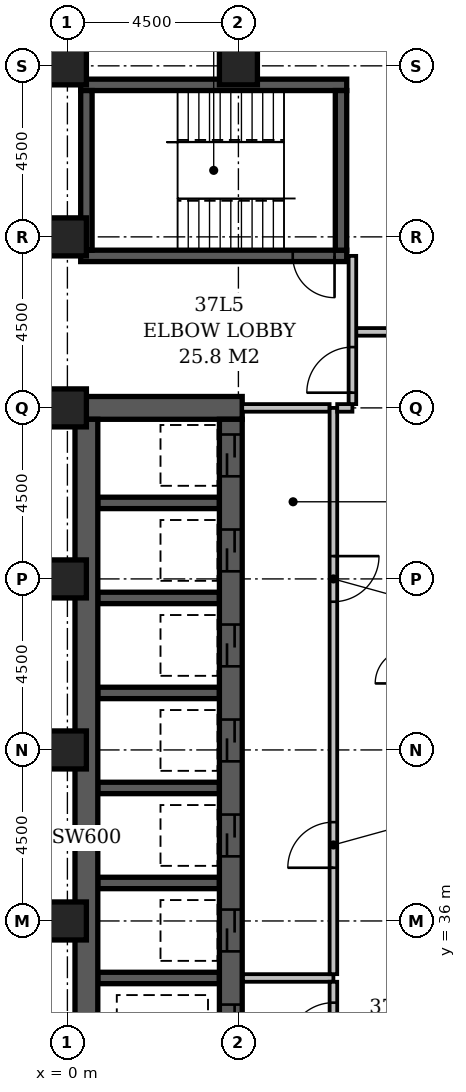
"""IFC4 building model, lengths in metres.
Left out: names, types, materials, properties, quantities, classifications, styles, units other than length and angle.
Written with IfcOpenShell. Run it as: python <this file> out.ifc"""

import sys

from ifc_helpers import new_model, si_unit, direction, frame, frame_2d, origin, origin_2d, place, context, subcontext, project, spatial, rectangle, extrude, element, fill, save


model = new_model("IFC4")
c1 = context("Model", 3, precision=1e-05, world=origin(), true_north=direction((0.0, 1.0)))
c2 = subcontext(c1, "Body", "Model", "MODEL_VIEW")
j1 = project(units=[si_unit("LENGTHUNIT", "METRE"), si_unit("PLANEANGLEUNIT", "RADIAN")], contexts=[c1])
p1 = place(None, origin())
s1 = spatial("IfcSite", under=j1, at=p1, CompositionType="ELEMENT")
p2 = place(p1, origin())
s2 = spatial("IfcBuilding", under=s1, at=p2, CompositionType="ELEMENT")
p3 = place(p2, frame((0.0, 0.0, 148.4)))
s3 = spatial("IfcBuildingStorey", under=s2, at=p3, CompositionType="ELEMENT", Elevation=148.4)
p4 = place(p3, frame((0.2, 49.5, -0.3), z_axis=(0.0, 0.0, 1.0), x_axis=(1.0, 0.0, 0.0)))
e1 = element("IfcWall", 1, at=p4, inside=s3, PredefinedType="SHEAR", context=c2, shape_type="SweptSolid", body=[
    extrude(rectangle(XDim=4.4, YDim=0.6, at=frame_2d((2.2, 0.0))), origin(), (0.0, 0.0, 1.0), 3.6),
])
p5 = place(p3, frame((0.35, 53.5, -0.3), z_axis=(0.0, 0.0, 1.0), x_axis=(1.0, 0.0, 0.0)))
e2 = element("IfcWall", 2, at=p5, inside=s3, PredefinedType="SHEAR", context=c2, shape_type="SweptSolid", body=[
    extrude(rectangle(XDim=7.0, YDim=0.3, at=frame_2d((3.5, 0.0))), origin(), (0.0, 0.0, 1.0), 3.6),
])
p6 = place(p5, frame((5.58, 0.0, 0.3)))
e3 = element("IfcOpeningElement", 3, at=p6, cuts=e2, PredefinedType="OPENING", context=c2, shape_type="SweptSolid", body=[
    extrude(rectangle(XDim=1.1, YDim=2.1, at=frame_2d((0.55, 1.05))), frame((0.0, 0.162, 0.0), z_axis=(0.0, -1.0, 0.0), x_axis=(1.0, 0.0, 0.0)), (0.0, 0.0, 1.0), 0.324),
])
p7 = place(p3, frame((0.35, 58.0, -0.3), z_axis=(0.0, 0.0, 1.0), x_axis=(1.0, 0.0, 0.0)))
e4 = element("IfcWall", 4, at=p7, inside=s3, PredefinedType="SHEAR", context=c2, shape_type="SweptSolid", body=[
    extrude(rectangle(XDim=7.0, YDim=0.3, at=frame_2d((3.5, 0.0))), origin(), (0.0, 0.0, 1.0), 3.6),
])
p8 = place(p3, frame((0.5, 27.15, -0.3), z_axis=(0.0, 0.0, 1.0), x_axis=(0.0, 1.0, 0.0)))
e5 = element("IfcWall", 5, at=p8, inside=s3, PredefinedType="SHEAR", context=c2, shape_type="SweptSolid", body=[
    extrude(rectangle(XDim=22.05, YDim=0.6, at=frame_2d((11.025, 0.0))), origin(), (0.0, 0.0, 1.0), 3.6),
])
p9 = place(p3, frame((0.5, 53.65, -0.3), z_axis=(0.0, 0.0, 1.0), x_axis=(0.0, 1.0, 0.0)))
e6 = element("IfcWall", 6, at=p9, inside=s3, PredefinedType="SHEAR", context=c2, shape_type="SweptSolid", body=[
    extrude(rectangle(XDim=4.2, YDim=0.3, at=frame_2d((2.1, 0.0))), origin(), (0.0, 0.0, 1.0), 3.6),
])
for number, where, z_axis, x_axis in (
    (7, (0.8, 34.5, -0.3), (0.0, 0.0, 1.0), (1.0, 0.0, 0.0)),
    (8, (0.8, 37.0, -0.3), (0.0, 0.0, 1.0), (1.0, 0.0, 0.0)),
    (9, (0.8, 39.5, -0.3), (0.0, 0.0, 1.0), (1.0, 0.0, 0.0)),
    (10, (0.8, 42.0, -0.3), (0.0, 0.0, 1.0), (1.0, 0.0, 0.0)),
    (11, (0.8, 44.5, -0.3), (0.0, 0.0, 1.0), (1.0, 0.0, 0.0)),
    (12, (0.8, 47.0, -0.3), (0.0, 0.0, 1.0), (1.0, 0.0, 0.0)),
):
    element("IfcWall", number, at=place(p3, frame(where, z_axis=z_axis, x_axis=x_axis)), inside=s3, PredefinedType="SHEAR", context=c2, shape_type="SweptSolid", body=[
        extrude(rectangle(XDim=3.2, YDim=0.3, at=frame_2d((1.6, 0.0))), origin(), (0.0, 0.0, 1.0), 3.6),
    ])
p10 = place(p3, frame((4.3, 27.15, -0.3), z_axis=(0.0, 0.0, 1.0), x_axis=(0.0, 1.0, 0.0)))
e13 = element("IfcWall", 13, at=p10, inside=s3, PredefinedType="SHEAR", context=c2, shape_type="SweptSolid", body=[
    extrude(rectangle(XDim=22.05, YDim=0.6, at=frame_2d((11.025, 0.0))), origin(), (0.0, 0.0, 1.0), 3.6),
])
p11 = place(p10, frame((3.05, 0.0, 0.3)))
e14 = element("IfcOpeningElement", 14, at=p11, cuts=e13, PredefinedType="OPENING", context=c2, shape_type="SweptSolid", body=[
    extrude(rectangle(XDim=1.1, YDim=2.1, at=frame_2d((0.55, 1.05))), frame((0.0, 0.312, 0.0), z_axis=(0.0, -1.0, 0.0), x_axis=(1.0, 0.0, 0.0)), (0.0, 0.0, 1.0), 0.624),
])
p12 = place(p10, frame((0.55, 0.0, 0.3)))
e15 = element("IfcOpeningElement", 15, at=p12, cuts=e13, PredefinedType="OPENING", context=c2, shape_type="SweptSolid", body=[
    extrude(rectangle(XDim=1.1, YDim=2.1, at=frame_2d((0.55, 1.05))), frame((0.0, 0.312, 0.0), z_axis=(0.0, -1.0, 0.0), x_axis=(1.0, 0.0, 0.0)), (0.0, 0.0, 1.0), 0.624),
])
p13 = place(p10, frame((20.55, 0.0, 0.3)))
e16 = element("IfcOpeningElement", 16, at=p13, cuts=e13, PredefinedType="OPENING", context=c2, shape_type="SweptSolid", body=[
    extrude(rectangle(XDim=1.1, YDim=2.1, at=frame_2d((0.55, 1.05))), frame((0.0, 0.312, 0.0), z_axis=(0.0, -1.0, 0.0), x_axis=(1.0, 0.0, 0.0)), (0.0, 0.0, 1.0), 0.624),
])
p14 = place(p10, frame((18.05, 0.0, 0.3)))
e17 = element("IfcOpeningElement", 17, at=p14, cuts=e13, PredefinedType="OPENING", context=c2, shape_type="SweptSolid", body=[
    extrude(rectangle(XDim=1.1, YDim=2.1, at=frame_2d((0.55, 1.05))), frame((0.0, 0.312, 0.0), z_axis=(0.0, -1.0, 0.0), x_axis=(1.0, 0.0, 0.0)), (0.0, 0.0, 1.0), 0.624),
])
p15 = place(p10, frame((15.55, 0.0, 0.3)))
e18 = element("IfcOpeningElement", 18, at=p15, cuts=e13, PredefinedType="OPENING", context=c2, shape_type="SweptSolid", body=[
    extrude(rectangle(XDim=1.1, YDim=2.1, at=frame_2d((0.55, 1.05))), frame((0.0, 0.312, 0.0), z_axis=(0.0, -1.0, 0.0), x_axis=(1.0, 0.0, 0.0)), (0.0, 0.0, 1.0), 0.624),
])
p16 = place(p10, frame((13.05, 0.0, 0.3)))
e19 = element("IfcOpeningElement", 19, at=p16, cuts=e13, PredefinedType="OPENING", context=c2, shape_type="SweptSolid", body=[
    extrude(rectangle(XDim=1.1, YDim=2.1, at=frame_2d((0.55, 1.05))), frame((0.0, 0.312, 0.0), z_axis=(0.0, -1.0, 0.0), x_axis=(1.0, 0.0, 0.0)), (0.0, 0.0, 1.0), 0.624),
])
p17 = place(p10, frame((10.55, 0.0, 0.3)))
e20 = element("IfcOpeningElement", 20, at=p17, cuts=e13, PredefinedType="OPENING", context=c2, shape_type="SweptSolid", body=[
    extrude(rectangle(XDim=1.1, YDim=2.1, at=frame_2d((0.55, 1.05))), frame((0.0, 0.312, 0.0), z_axis=(0.0, -1.0, 0.0), x_axis=(1.0, 0.0, 0.0)), (0.0, 0.0, 1.0), 0.624),
])
p18 = place(p10, frame((8.05, 0.0, 0.3)))
e21 = element("IfcOpeningElement", 21, at=p18, cuts=e13, PredefinedType="OPENING", context=c2, shape_type="SweptSolid", body=[
    extrude(rectangle(XDim=1.1, YDim=2.1, at=frame_2d((0.55, 1.05))), frame((0.0, 0.312, 0.0), z_axis=(0.0, -1.0, 0.0), x_axis=(1.0, 0.0, 0.0)), (0.0, 0.0, 1.0), 0.624),
])
p19 = place(p10, frame((5.55, 0.0, 0.3)))
e22 = element("IfcOpeningElement", 22, at=p19, cuts=e13, PredefinedType="OPENING", context=c2, shape_type="SweptSolid", body=[
    extrude(rectangle(XDim=1.1, YDim=2.1, at=frame_2d((0.55, 1.05))), frame((0.0, 0.312, 0.0), z_axis=(0.0, -1.0, 0.0), x_axis=(1.0, 0.0, 0.0)), (0.0, 0.0, 1.0), 0.624),
])
p20 = place(p3, frame((7.2, 53.65, -0.3), z_axis=(0.0, 0.0, 1.0), x_axis=(0.0, 1.0, 0.0)))
e23 = element("IfcWall", 23, at=p20, inside=s3, PredefinedType="SHEAR", context=c2, shape_type="SweptSolid", body=[
    extrude(rectangle(XDim=4.2, YDim=0.3, at=frame_2d((2.1, 0.0))), origin(), (0.0, 0.0, 1.0), 3.6),
])
for number, where, z_axis, x_axis in (
    (24, (0.0, 36.0, -0.3), (0.0, 0.0, 1.0), (1.0, 0.0, 0.0)),
    (25, (0.0, 40.5, -0.3), (0.0, 0.0, 1.0), (1.0, 0.0, 0.0)),
    (26, (0.0, 45.0, -0.3), (0.0, 0.0, 1.0), (1.0, 0.0, 0.0)),
    (27, (0.0, 49.5, -0.3), (0.0, 0.0, 1.0), (1.0, 0.0, 0.0)),
    (28, (0.0, 54.0, -0.3), (0.0, 0.0, 1.0), (1.0, 0.0, 0.0)),
    (29, (0.0, 58.5, -0.3), (0.0, 0.0, 1.0), (1.0, 0.0, 0.0)),
    (30, (4.5, 58.5, -0.3), (0.0, 0.0, 1.0), (1.0, 0.0, 0.0)),
):
    element("IfcColumn", number, at=place(p3, frame(where, z_axis=z_axis, x_axis=x_axis)), inside=s3, PredefinedType="COLUMN", context=c2, shape_type="SweptSolid", body=[
        extrude(rectangle(XDim=1.0, YDim=1.0, at=origin_2d()), origin(), (0.0, 0.0, 1.0), 3.6),
    ])
p21 = place(p3, frame((4.62, 34.5, 0.0), z_axis=(0.0, 0.0, 1.0), x_axis=(1.0, 0.0, 0.0)))
e31 = element("IfcWall", 31, at=p21, inside=s3, PredefinedType="PARTITIONING", context=c2, shape_type="SweptSolid", body=[
    extrude(rectangle(XDim=2.38, YDim=0.2, at=frame_2d((1.19, 0.0))), origin(), (0.0, 0.0, 1.0), 3.3),
])
p22 = place(p3, frame((7.0, 34.6, 0.0), z_axis=(0.0, 0.0, 1.0), x_axis=(0.0, 1.0, 0.0)))
e32 = element("IfcWall", 32, at=p22, inside=s3, PredefinedType="PARTITIONING", context=c2, shape_type="SweptSolid", body=[
    extrude(rectangle(XDim=14.9, YDim=0.2, at=frame_2d((7.45, 0.0))), origin(), (0.0, 0.0, 1.0), 3.3),
])
p23 = place(p22, frame((2.8, 0.0, 0.0)))
e33 = element("IfcOpeningElement", 33, at=p23, cuts=e32, PredefinedType="OPENING", context=c2, shape_type="SweptSolid", body=[
    extrude(rectangle(XDim=1.2, YDim=2.1, at=frame_2d((0.6, 1.05))), frame((0.0, 0.112, 0.0), z_axis=(0.0, -1.0, 0.0), x_axis=(1.0, 0.0, 0.0)), (0.0, 0.0, 1.0), 0.224),
])
p24 = place(p22, frame((9.8, 0.0, 0.0)))
e34 = element("IfcOpeningElement", 34, at=p24, cuts=e32, PredefinedType="OPENING", context=c2, shape_type="SweptSolid", body=[
    extrude(rectangle(XDim=1.2, YDim=2.1, at=frame_2d((0.6, 1.05))), frame((0.0, 0.112, 0.0), z_axis=(0.0, -1.0, 0.0), x_axis=(1.0, 0.0, 0.0)), (0.0, 0.0, 1.0), 0.224),
])
p25 = place(p3, frame((4.6, 49.5, 0.0), z_axis=(0.0, 0.0, 1.0), x_axis=(1.0, 0.0, 0.0)))
e35 = element("IfcWall", 35, at=p25, inside=s3, PredefinedType="PARTITIONING", context=c2, shape_type="SweptSolid", body=[
    extrude(rectangle(XDim=2.3, YDim=0.2, at=frame_2d((1.15, 0.0))), origin(), (0.0, 0.0, 1.0), 3.3),
])
p26 = place(p3, frame((7.0, 32.1, 0.0), z_axis=(0.0, 0.0, 1.0), x_axis=(0.0, 1.0, 0.0)))
e36 = element("IfcWall", 36, at=p26, inside=s3, PredefinedType="PARTITIONING", context=c2, shape_type="SweptSolid", body=[
    extrude(rectangle(XDim=2.3, YDim=0.2, at=frame_2d((1.15, 0.0))), origin(), (0.0, 0.0, 1.0), 3.3),
])
p27 = place(p26, frame((0.55, 0.0, 0.0)))
e37 = element("IfcOpeningElement", 37, at=p27, cuts=e36, PredefinedType="OPENING", context=c2, shape_type="SweptSolid", body=[
    extrude(rectangle(XDim=1.2, YDim=2.1, at=frame_2d((0.6, 1.05))), frame((0.0, 0.112, 0.0), z_axis=(0.0, -1.0, 0.0), x_axis=(1.0, 0.0, 0.0)), (0.0, 0.0, 1.0), 0.224),
])
p28 = place(p3, frame((7.1, 49.5, 0.0), z_axis=(0.0, 0.0, 1.0), x_axis=(1.0, 0.0, 0.0)))
e38 = element("IfcWall", 38, at=p28, inside=s3, PredefinedType="PARTITIONING", context=c2, shape_type="SweptSolid", body=[
    extrude(rectangle(XDim=0.4, YDim=0.2, at=frame_2d((0.2, 0.0))), origin(), (0.0, 0.0, 1.0), 3.3),
])
p29 = place(p3, frame((7.5, 49.6, 0.0), z_axis=(0.0, 0.0, 1.0), x_axis=(0.0, 1.0, 0.0)))
e39 = element("IfcWall", 39, at=p29, inside=s3, PredefinedType="PARTITIONING", context=c2, shape_type="SweptSolid", body=[
    extrude(rectangle(XDim=3.9, YDim=0.2, at=frame_2d((1.95, 0.0))), origin(), (0.0, 0.0, 1.0), 3.3),
])
p30 = place(p29, frame((0.3, 0.0, 0.0)))
e40 = element("IfcOpeningElement", 40, at=p30, cuts=e39, PredefinedType="OPENING", context=c2, shape_type="SweptSolid", body=[
    extrude(rectangle(XDim=1.2, YDim=2.1, at=frame_2d((0.6, 1.05))), frame((0.0, 0.112, 0.0), z_axis=(0.0, -1.0, 0.0), x_axis=(1.0, 0.0, 0.0)), (0.0, 0.0, 1.0), 0.224),
])
p31 = place(p3, frame((7.6, 51.5, 0.0), z_axis=(0.0, 0.0, 1.0), x_axis=(1.0, 0.0, 0.0)))
e41 = element("IfcWall", 41, at=p31, inside=s3, PredefinedType="PARTITIONING", context=c2, shape_type="SweptSolid", body=[
    extrude(rectangle(XDim=15.3, YDim=0.2, at=frame_2d((7.65, 0.0))), origin(), (0.0, 0.0, 1.0), 3.3),
])
p32 = place(p31, frame((3.55, 0.0, 0.0)))
e42 = element("IfcOpeningElement", 42, at=p32, cuts=e41, PredefinedType="OPENING", context=c2, shape_type="SweptSolid", body=[
    extrude(rectangle(XDim=0.9, YDim=2.1, at=frame_2d((0.45, 1.05))), frame((0.0, 0.112, 0.0), z_axis=(0.0, -1.0, 0.0), x_axis=(1.0, 0.0, 0.0)), (0.0, 0.0, 1.0), 0.224),
])
p33 = place(p31, frame((11.3, 0.0, 0.0)))
e43 = element("IfcOpeningElement", 43, at=p33, cuts=e41, PredefinedType="OPENING", context=c2, shape_type="SweptSolid", body=[
    extrude(rectangle(XDim=0.9, YDim=2.1, at=frame_2d((0.45, 1.05))), frame((0.0, 0.112, 0.0), z_axis=(0.0, -1.0, 0.0), x_axis=(1.0, 0.0, 0.0)), (0.0, 0.0, 1.0), 0.224),
])
p34 = place(p30, origin())
e44 = element("IfcDoor", 44, at=p34, inside=s3, OperationType="SINGLE_SWING_LEFT", PredefinedType="DOOR", context=c2, shape_type="SweptSolid", body=[
    extrude(rectangle(XDim=1.2, YDim=2.1, at=frame_2d((0.6, 1.05))), frame((0.0, 0.025, 0.0), z_axis=(0.0, -1.0, 0.0), x_axis=(1.0, 0.0, 0.0)), (0.0, 0.0, 1.0), 0.05),
])
fill(e40, e44)
p35 = place(p13, origin())
e45 = element("IfcDoor", 45, at=p35, inside=s3, OperationType="SLIDING_TO_LEFT", PredefinedType="DOOR", context=c2, shape_type="SweptSolid", body=[
    extrude(rectangle(XDim=1.1, YDim=2.1, at=frame_2d((0.55, 1.05))), frame((0.0, 0.025, 0.0), z_axis=(0.0, -1.0, 0.0), x_axis=(1.0, 0.0, 0.0)), (0.0, 0.0, 1.0), 0.05),
])
fill(e16, e45)
p36 = place(p14, origin())
e46 = element("IfcDoor", 46, at=p36, inside=s3, OperationType="SLIDING_TO_LEFT", PredefinedType="DOOR", context=c2, shape_type="SweptSolid", body=[
    extrude(rectangle(XDim=1.1, YDim=2.1, at=frame_2d((0.55, 1.05))), frame((0.0, 0.025, 0.0), z_axis=(0.0, -1.0, 0.0), x_axis=(1.0, 0.0, 0.0)), (0.0, 0.0, 1.0), 0.05),
])
fill(e17, e46)
p37 = place(p15, origin())
e47 = element("IfcDoor", 47, at=p37, inside=s3, OperationType="SLIDING_TO_LEFT", PredefinedType="DOOR", context=c2, shape_type="SweptSolid", body=[
    extrude(rectangle(XDim=1.1, YDim=2.1, at=frame_2d((0.55, 1.05))), frame((0.0, 0.025, 0.0), z_axis=(0.0, -1.0, 0.0), x_axis=(1.0, 0.0, 0.0)), (0.0, 0.0, 1.0), 0.05),
])
fill(e18, e47)
p38 = place(p16, origin())
e48 = element("IfcDoor", 48, at=p38, inside=s3, OperationType="SLIDING_TO_LEFT", PredefinedType="DOOR", context=c2, shape_type="SweptSolid", body=[
    extrude(rectangle(XDim=1.1, YDim=2.1, at=frame_2d((0.55, 1.05))), frame((0.0, 0.025, 0.0), z_axis=(0.0, -1.0, 0.0), x_axis=(1.0, 0.0, 0.0)), (0.0, 0.0, 1.0), 0.05),
])
fill(e19, e48)
p39 = place(p17, origin())
e49 = element("IfcDoor", 49, at=p39, inside=s3, OperationType="SLIDING_TO_LEFT", PredefinedType="DOOR", context=c2, shape_type="SweptSolid", body=[
    extrude(rectangle(XDim=1.1, YDim=2.1, at=frame_2d((0.55, 1.05))), frame((0.0, 0.025, 0.0), z_axis=(0.0, -1.0, 0.0), x_axis=(1.0, 0.0, 0.0)), (0.0, 0.0, 1.0), 0.05),
])
fill(e20, e49)
p40 = place(p18, origin())
e50 = element("IfcDoor", 50, at=p40, inside=s3, OperationType="SLIDING_TO_LEFT", PredefinedType="DOOR", context=c2, shape_type="SweptSolid", body=[
    extrude(rectangle(XDim=1.1, YDim=2.1, at=frame_2d((0.55, 1.05))), frame((0.0, 0.025, 0.0), z_axis=(0.0, -1.0, 0.0), x_axis=(1.0, 0.0, 0.0)), (0.0, 0.0, 1.0), 0.05),
])
fill(e21, e50)
p41 = place(p23, origin())
e51 = element("IfcDoor", 51, at=p41, inside=s3, OperationType="SINGLE_SWING_LEFT", PredefinedType="DOOR", context=c2, shape_type="SweptSolid", body=[
    extrude(rectangle(XDim=1.2, YDim=2.1, at=frame_2d((0.6, 1.05))), frame((0.0, 0.025, 0.0), z_axis=(0.0, -1.0, 0.0), x_axis=(1.0, 0.0, 0.0)), (0.0, 0.0, 1.0), 0.05),
])
fill(e33, e51)
p42 = place(p24, origin())
e52 = element("IfcDoor", 52, at=p42, inside=s3, OperationType="SINGLE_SWING_RIGHT", PredefinedType="DOOR", context=c2, shape_type="SweptSolid", body=[
    extrude(rectangle(XDim=1.2, YDim=2.1, at=frame_2d((0.6, 1.05))), frame((0.0, 0.025, 0.0), z_axis=(0.0, -1.0, 0.0), x_axis=(1.0, 0.0, 0.0)), (0.0, 0.0, 1.0), 0.05),
])
fill(e34, e52)
p43 = place(p27, origin())
e53 = element("IfcDoor", 53, at=p43, inside=s3, OperationType="SINGLE_SWING_LEFT", PredefinedType="DOOR", context=c2, shape_type="SweptSolid", body=[
    extrude(rectangle(XDim=1.2, YDim=2.1, at=frame_2d((0.6, 1.05))), frame((0.0, 0.025, 0.0), z_axis=(0.0, -1.0, 0.0), x_axis=(1.0, 0.0, 0.0)), (0.0, 0.0, 1.0), 0.05),
])
fill(e37, e53)
p44 = place(p19, origin())
e54 = element("IfcDoor", 54, at=p44, inside=s3, OperationType="SLIDING_TO_LEFT", PredefinedType="DOOR", context=c2, shape_type="SweptSolid", body=[
    extrude(rectangle(XDim=1.1, YDim=2.1, at=frame_2d((0.55, 1.05))), frame((0.0, 0.025, 0.0), z_axis=(0.0, -1.0, 0.0), x_axis=(1.0, 0.0, 0.0)), (0.0, 0.0, 1.0), 0.05),
])
fill(e22, e54)
p45 = place(p6, origin())
e55 = element("IfcDoor", 55, at=p45, inside=s3, OperationType="SINGLE_SWING_RIGHT", PredefinedType="DOOR", context=c2, shape_type="SweptSolid", body=[
    extrude(rectangle(XDim=1.1, YDim=2.1, at=frame_2d((0.55, 1.05))), frame((0.0, 0.025, 0.0), z_axis=(0.0, -1.0, 0.0), x_axis=(1.0, 0.0, 0.0)), (0.0, 0.0, 1.0), 0.05),
])
fill(e3, e55)
save(model, sys.argv[1])
